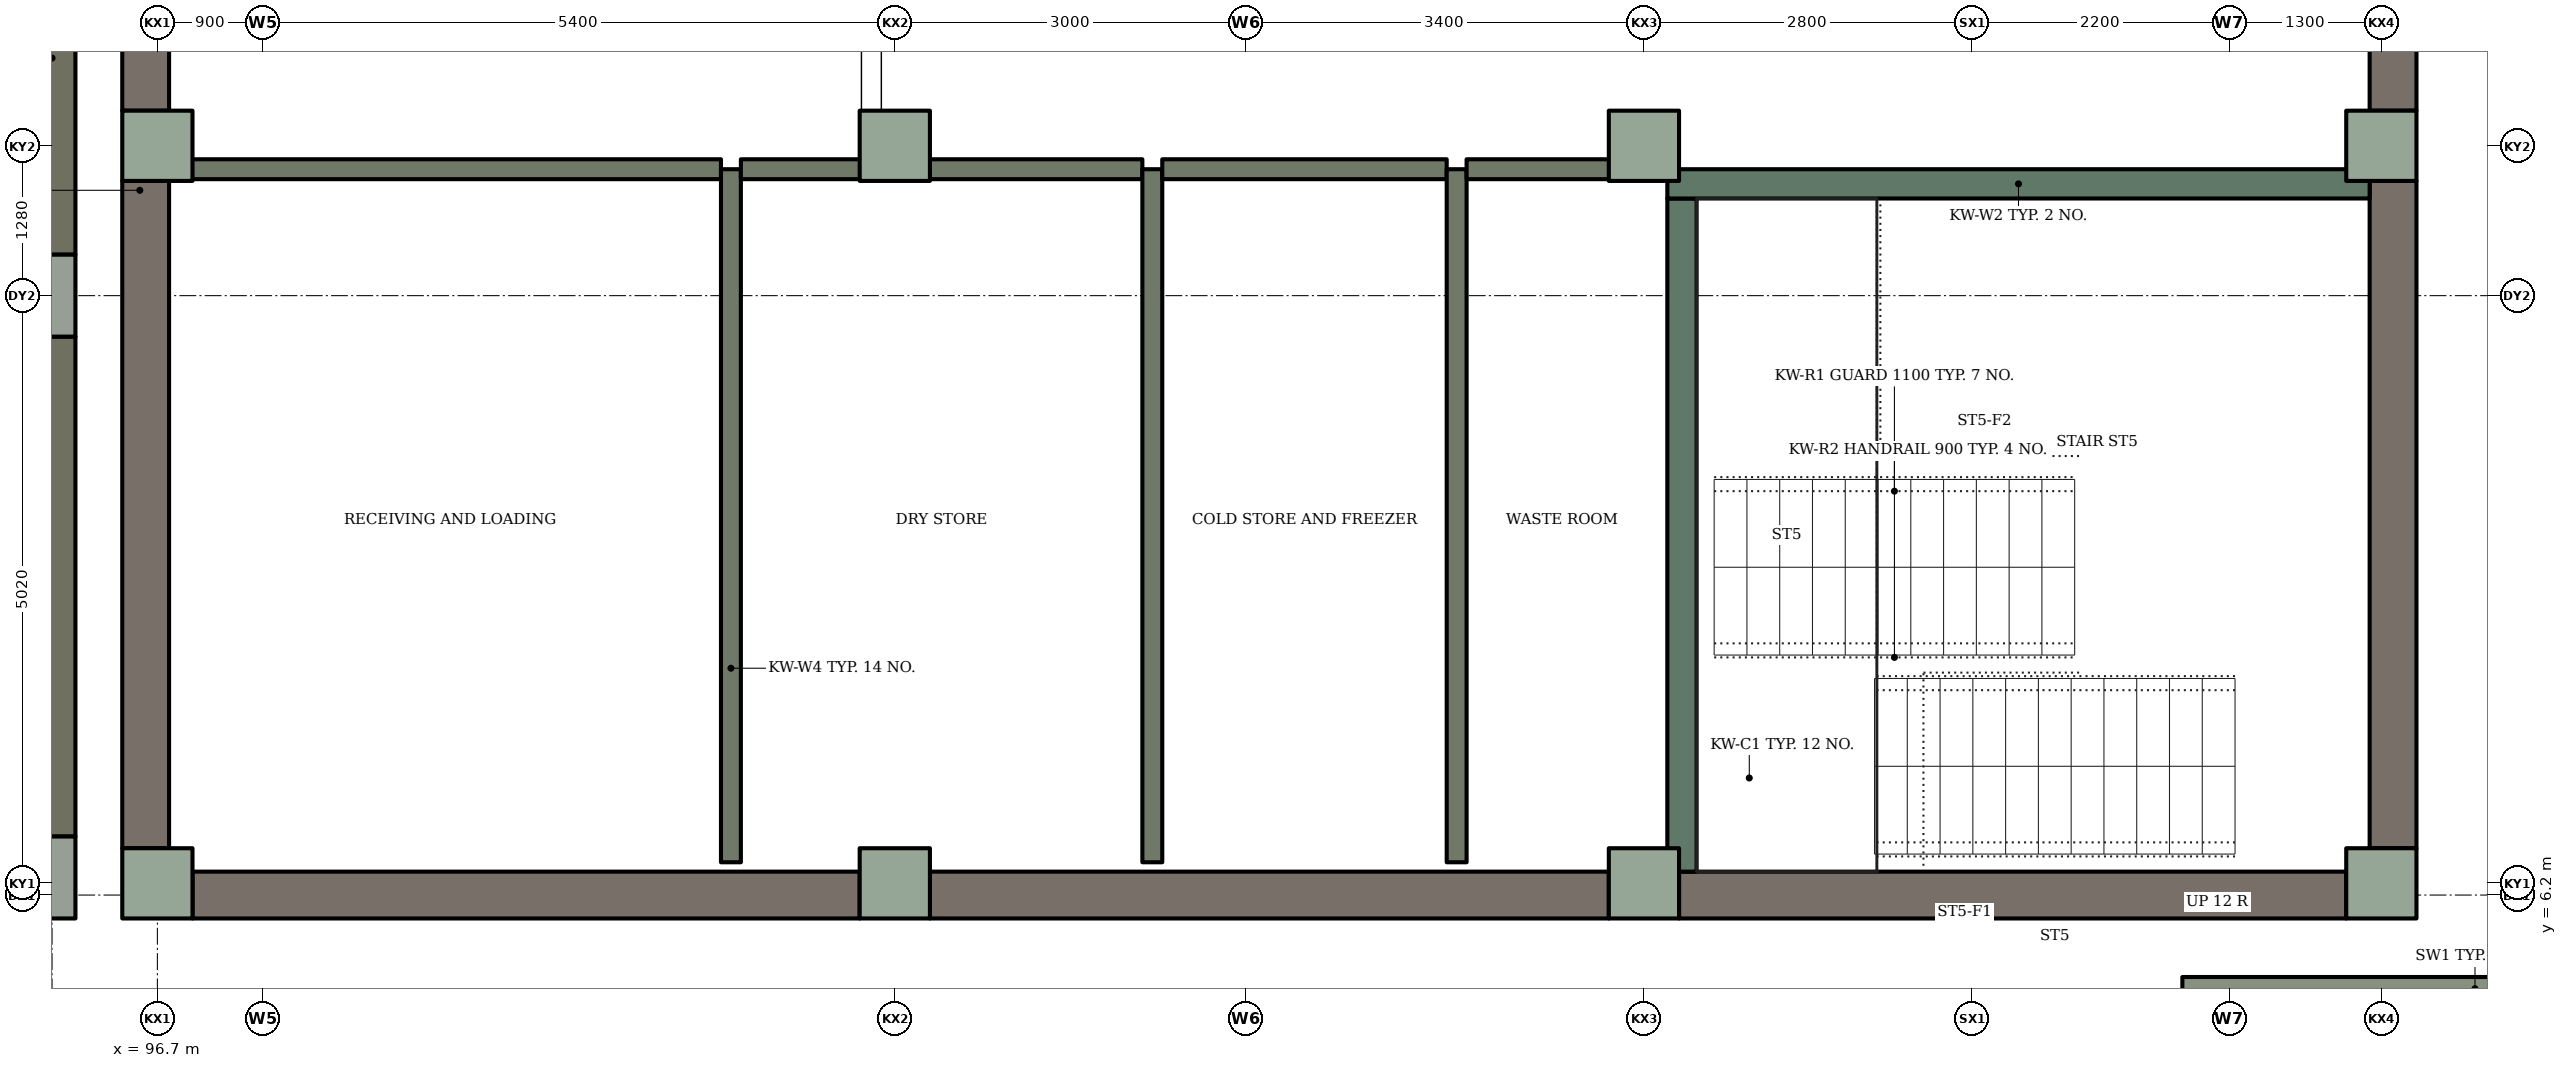
"""IFC4 building model, lengths in metres.
Left out: names, types, materials, properties, quantities, classifications, styles, units other than length and angle.
Written with IfcOpenShell. Run it as: python <this file> out.ifc"""

import sys

from ifc_helpers import new_model, si_unit, direction, frame, frame_2d, origin, origin_2d, place, context, subcontext, project, spatial, rectangle, extrude, element, fill, save


model = new_model("IFC4")
c1 = context("Model", 3, precision=1e-05, world=origin(), true_north=direction((0.0, 1.0)))
c2 = subcontext(c1, "Body", "Model", "MODEL_VIEW")
j1 = project(units=[si_unit("LENGTHUNIT", "METRE"), si_unit("PLANEANGLEUNIT", "RADIAN")], contexts=[c1])
p1 = place(None, origin())
s1 = spatial("IfcSite", under=j1, at=p1, CompositionType="ELEMENT")
p2 = place(p1, origin())
s2 = spatial("IfcBuilding", under=s1, at=p2, CompositionType="ELEMENT")
p3 = place(p2, origin())
s3 = spatial("IfcBuildingStorey", under=s2, at=p3, CompositionType="ELEMENT", Elevation=0.0)
for number, where, z_axis, x_axis in (
    (1, (95.65, 6.35, 0.0), (0.0, 0.0, 1.0), (1.0, 0.0, 0.0)),
    (2, (95.65, 11.32, 0.0), (0.0, 0.0, 1.0), (1.0, 0.0, 0.0)),
):
    element("IfcColumn", number, at=place(p3, frame(where, z_axis=z_axis, x_axis=x_axis)), inside=s3, PredefinedType="COLUMN", context=c2, shape_type="SweptSolid", body=[
        extrude(rectangle(XDim=0.7, YDim=0.7, at=origin_2d()), origin(), (0.0, 0.0, 1.0), 4.2),
    ])
p4 = place(p3, frame((95.8, 6.7, 0.0), z_axis=(0.0, 0.0, 1.0), x_axis=(0.0, 1.0, 0.0)))
e3 = element("IfcWall", 3, at=p4, inside=s3, PredefinedType="SOLIDWALL", context=c2, shape_type="SweptSolid", body=[
    extrude(rectangle(XDim=4.27, YDim=0.4, at=frame_2d((2.135, 0.0))), origin(), (0.0, 0.0, 1.0), 4.2),
])
p5 = place(p4, frame((1.635, 0.0, 0.9)))
e4 = element("IfcOpeningElement", 4, at=p5, cuts=e3, PredefinedType="OPENING", context=c2, shape_type="SweptSolid", body=[
    extrude(rectangle(XDim=1.0, YDim=2.4, at=frame_2d((0.5, 1.2))), frame((0.0, 0.21, 0.0), z_axis=(0.0, -1.0, 0.0), x_axis=(1.0, 0.0, 0.0)), (0.0, 0.0, 1.0), 0.42),
])
p6 = place(p3, frame((95.8, 11.67, 0.0), z_axis=(0.0, 0.0, 1.0), x_axis=(0.0, 1.0, 0.0)))
e5 = element("IfcWall", 5, at=p6, inside=s3, PredefinedType="SOLIDWALL", context=c2, shape_type="SweptSolid", body=[
    extrude(rectangle(XDim=4.42, YDim=0.4, at=frame_2d((2.21, 0.0))), origin(), (0.0, 0.0, 1.0), 4.2),
])
p7 = place(p6, frame((2.58, 0.0, 0.0)))
e6 = element("IfcOpeningElement", 6, at=p7, cuts=e5, PredefinedType="OPENING", context=c2, shape_type="SweptSolid", body=[
    extrude(rectangle(XDim=1.5, YDim=2.1, at=frame_2d((0.75, 1.05))), frame((0.0, 0.21, 0.0), z_axis=(0.0, -1.0, 0.0), x_axis=(1.0, 0.0, 0.0)), (0.0, 0.0, 1.0), 0.42),
])
for number, where, z_axis, x_axis in (
    (7, (96.7, 6.3, 0.0), (0.0, 0.0, 1.0), (1.0, 0.0, 0.0)),
    (8, (96.7, 12.6, 0.0), (0.0, 0.0, 1.0), (1.0, 0.0, 0.0)),
    (9, (103.0, 6.3, 0.0), (0.0, 0.0, 1.0), (1.0, 0.0, 0.0)),
    (10, (103.0, 12.6, 0.0), (0.0, 0.0, 1.0), (1.0, 0.0, 0.0)),
    (11, (109.4, 6.3, 0.0), (0.0, 0.0, 1.0), (1.0, 0.0, 0.0)),
    (12, (109.4, 12.6, 0.0), (0.0, 0.0, 1.0), (1.0, 0.0, 0.0)),
    (13, (115.7, 6.3, 0.0), (0.0, 0.0, 1.0), (1.0, 0.0, 0.0)),
    (14, (115.7, 12.6, 0.0), (0.0, 0.0, 1.0), (1.0, 0.0, 0.0)),
):
    element("IfcColumn", number, at=place(p3, frame(where, z_axis=z_axis, x_axis=x_axis)), inside=s3, PredefinedType="COLUMN", context=c2, shape_type="SweptSolid", body=[
        extrude(rectangle(XDim=0.6, YDim=0.6, at=origin_2d()), origin(), (0.0, 0.0, 1.0), 4.2),
    ])
p8 = place(p3, frame((97.0, 6.2, 0.0), z_axis=(0.0, 0.0, 1.0), x_axis=(1.0, 0.0, 0.0)))
e15 = element("IfcWall", 15, at=p8, inside=s3, PredefinedType="SOLIDWALL", context=c2, shape_type="SweptSolid", body=[
    extrude(rectangle(XDim=5.7, YDim=0.4, at=frame_2d((2.85, 0.0))), origin(), (0.0, 0.0, 1.0), 4.2),
])
p9 = place(p8, frame((1.35, 0.0, 0.0)))
e16 = element("IfcOpeningElement", 16, at=p9, cuts=e15, PredefinedType="OPENING", context=c2, shape_type="SweptSolid", body=[
    extrude(rectangle(XDim=3.0, YDim=3.0, at=frame_2d((1.5, 1.5))), frame((0.0, 0.21, 0.0), z_axis=(0.0, -1.0, 0.0), x_axis=(1.0, 0.0, 0.0)), (0.0, 0.0, 1.0), 0.42),
])
p10 = place(p3, frame((103.3, 6.2, 0.0), z_axis=(0.0, 0.0, 1.0), x_axis=(1.0, 0.0, 0.0)))
e17 = element("IfcWall", 17, at=p10, inside=s3, PredefinedType="SOLIDWALL", context=c2, shape_type="SweptSolid", body=[
    extrude(rectangle(XDim=5.8, YDim=0.4, at=frame_2d((2.9, 0.0))), origin(), (0.0, 0.0, 1.0), 4.2),
])
p11 = place(p10, frame((4.6, 0.0, 0.0)))
e18 = element("IfcOpeningElement", 18, at=p11, cuts=e17, PredefinedType="OPENING", context=c2, shape_type="SweptSolid", body=[
    extrude(rectangle(XDim=1.0, YDim=2.1, at=frame_2d((0.5, 1.05))), frame((0.0, 0.21, 0.0), z_axis=(0.0, -1.0, 0.0), x_axis=(1.0, 0.0, 0.0)), (0.0, 0.0, 1.0), 0.42),
])
for number, where, z_axis, x_axis in (
    (19, (109.7, 6.2, 0.0), (0.0, 0.0, 1.0), (1.0, 0.0, 0.0)),
    (20, (96.6, 12.3, 0.0), (0.0, 0.0, 1.0), (0.0, -1.0, 0.0)),
):
    element("IfcWall", number, at=place(p3, frame(where, z_axis=z_axis, x_axis=x_axis)), inside=s3, PredefinedType="SOLIDWALL", context=c2, shape_type="SweptSolid", body=[
        extrude(rectangle(XDim=5.7, YDim=0.4, at=frame_2d((2.85, 0.0))), origin(), (0.0, 0.0, 1.0), 4.2),
    ])
p12 = place(p3, frame((96.6, 18.7, 0.0), z_axis=(0.0, 0.0, 1.0), x_axis=(0.0, -1.0, 0.0)))
e21 = element("IfcWall", 21, at=p12, inside=s3, PredefinedType="SOLIDWALL", context=c2, shape_type="SweptSolid", body=[
    extrude(rectangle(XDim=5.8, YDim=0.4, at=frame_2d((2.9, 0.0))), origin(), (0.0, 0.0, 1.0), 4.2),
])
p13 = place(p12, frame((2.95, 0.0, 0.0)))
e22 = element("IfcOpeningElement", 22, at=p13, cuts=e21, PredefinedType="OPENING", context=c2, shape_type="SweptSolid", body=[
    extrude(rectangle(XDim=1.5, YDim=2.1, at=frame_2d((0.75, 1.05))), frame((0.0, 0.21, 0.0), z_axis=(0.0, -1.0, 0.0), x_axis=(1.0, 0.0, 0.0)), (0.0, 0.0, 1.0), 0.42),
])
p14 = place(p3, frame((115.8, 12.3, 0.0), z_axis=(0.0, 0.0, 1.0), x_axis=(0.0, -1.0, 0.0)))
e23 = element("IfcWall", 23, at=p14, inside=s3, PredefinedType="SOLIDWALL", context=c2, shape_type="SweptSolid", body=[
    extrude(rectangle(XDim=5.7, YDim=0.4, at=frame_2d((2.85, 0.0))), origin(), (0.0, 0.0, 1.0), 4.2),
])
p15 = place(p14, frame((1.6, 0.0, 0.0)))
e24 = element("IfcOpeningElement", 24, at=p15, cuts=e23, PredefinedType="OPENING", context=c2, shape_type="SweptSolid", body=[
    extrude(rectangle(XDim=1.0, YDim=2.4, at=frame_2d((0.5, 1.2))), frame((0.0, 0.21, 0.0), z_axis=(0.0, -1.0, 0.0), x_axis=(1.0, 0.0, 0.0)), (0.0, 0.0, 1.0), 0.42),
])
p16 = place(p3, frame((115.8, 18.7, 0.0), z_axis=(0.0, 0.0, 1.0), x_axis=(0.0, -1.0, 0.0)))
e25 = element("IfcWall", 25, at=p16, inside=s3, PredefinedType="SOLIDWALL", context=c2, shape_type="SweptSolid", body=[
    extrude(rectangle(XDim=5.8, YDim=0.4, at=frame_2d((2.9, 0.0))), origin(), (0.0, 0.0, 1.0), 4.2),
])
p17 = place(p16, frame((1.7, 0.0, 1.5)))
e26 = element("IfcOpeningElement", 26, at=p17, cuts=e25, PredefinedType="OPENING", context=c2, shape_type="SweptSolid", body=[
    extrude(rectangle(XDim=2.4, YDim=1.2, at=frame_2d((1.2, 0.6))), frame((0.0, 0.21, 0.0), z_axis=(0.0, -1.0, 0.0), x_axis=(1.0, 0.0, 0.0)), (0.0, 0.0, 1.0), 0.42),
])
p18 = place(p3, frame((109.725, 6.4, 0.0), z_axis=(0.0, 0.0, 1.0), x_axis=(0.0, 1.0, 0.0)))
e27 = element("IfcWall", 27, at=p18, inside=s3, PredefinedType="SHEAR", context=c2, shape_type="SweptSolid", body=[
    extrude(rectangle(XDim=5.75, YDim=0.25, at=frame_2d((2.875, 0.0))), origin(), (0.0, 0.0, 1.0), 4.2),
])
p19 = place(p3, frame((109.6, 12.275, 0.0), z_axis=(0.0, 0.0, 1.0), x_axis=(1.0, 0.0, 0.0)))
e28 = element("IfcWall", 28, at=p19, inside=s3, PredefinedType="SHEAR", context=c2, shape_type="SweptSolid", body=[
    extrude(rectangle(XDim=6.0, YDim=0.25, at=frame_2d((3.0, 0.0))), origin(), (0.0, 0.0, 1.0), 4.2),
])
p20 = place(p19, frame((4.164, 0.0, 0.0)))
e29 = element("IfcOpeningElement", 29, at=p20, cuts=e28, PredefinedType="OPENING", context=c2, shape_type="SweptSolid", body=[
    extrude(rectangle(XDim=1.0, YDim=2.1, at=frame_2d((0.5, 1.05))), frame((0.0, 0.135, 0.0), z_axis=(0.0, -1.0, 0.0), x_axis=(1.0, 0.0, 0.0)), (0.0, 0.0, 1.0), 0.27),
])
p21 = place(p3, frame((114.0, 5.4, 0.0), z_axis=(0.0, 0.0, 1.0), x_axis=(1.0, 0.0, 0.0)))
e30 = element("IfcWall", 30, at=p21, inside=s3, PredefinedType="SOLIDWALL", context=c2, shape_type="SweptSolid", body=[
    extrude(rectangle(XDim=5.0, YDim=0.2, at=frame_2d((2.5, 0.0))), origin(), (0.0, 0.0, 1.0), 2.4),
])
p22 = place(p3, frame((96.8, 12.82, 0.0), z_axis=(0.0, 0.0, 1.0), x_axis=(0.0, -1.0, 0.0)))
e31 = element("IfcWall", 31, at=p22, inside=s3, PredefinedType="PARTITIONING", context=c2, shape_type="SweptSolid", body=[
    extrude(rectangle(XDim=0.42, YDim=0.17, at=frame_2d((0.21, 0.0))), origin(), (0.0, 0.0, 1.0), 3.92),
])
p23 = place(p3, frame((101.515, 12.4, 0.0), z_axis=(0.0, 0.0, 1.0), x_axis=(-1.0, 0.0, 0.0)))
e32 = element("IfcWall", 32, at=p23, inside=s3, PredefinedType="PARTITIONING", context=c2, shape_type="SweptSolid", body=[
    extrude(rectangle(XDim=4.63, YDim=0.17, at=frame_2d((2.315, 0.0))), origin(), (0.0, 0.0, 1.0), 3.92),
])
p24 = place(p23, frame((1.665, 0.0, 0.0)))
e33 = element("IfcOpeningElement", 33, at=p24, cuts=e32, PredefinedType="OPENING", context=c2, shape_type="SweptSolid", body=[
    extrude(rectangle(XDim=1.2, YDim=2.1, at=frame_2d((0.6, 1.05))), frame((0.0, 0.095, 0.0), z_axis=(0.0, -1.0, 0.0), x_axis=(1.0, 0.0, 0.0)), (0.0, 0.0, 1.0), 0.19),
])
p25 = place(p3, frame((101.6, 6.48, 0.0), z_axis=(0.0, 0.0, 1.0), x_axis=(0.0, 1.0, 0.0)))
e34 = element("IfcWall", 34, at=p25, inside=s3, PredefinedType="PARTITIONING", context=c2, shape_type="SweptSolid", body=[
    extrude(rectangle(XDim=5.92, YDim=0.17, at=frame_2d((2.96, 0.0))), origin(), (0.0, 0.0, 1.0), 3.92),
])
p26 = place(p25, frame((2.57, 0.0, 0.0)))
e35 = element("IfcOpeningElement", 35, at=p26, cuts=e34, PredefinedType="OPENING", context=c2, shape_type="SweptSolid", body=[
    extrude(rectangle(XDim=0.8, YDim=2.1, at=frame_2d((0.4, 1.05))), frame((0.0, 0.095, 0.0), z_axis=(0.0, -1.0, 0.0), x_axis=(1.0, 0.0, 0.0)), (0.0, 0.0, 1.0), 0.19),
])
p27 = place(p3, frame((102.78, 6.4, 0.0), z_axis=(0.0, 0.0, 1.0), x_axis=(1.0, 0.0, 0.0)))
e36 = element("IfcWall", 36, at=p27, inside=s3, PredefinedType="PARTITIONING", context=c2, shape_type="SweptSolid", body=[
    extrude(rectangle(XDim=0.44, YDim=0.17, at=frame_2d((0.22, 0.0))), origin(), (0.0, 0.0, 1.0), 3.92),
])
p28 = place(p3, frame((102.8, 12.4, 0.0), z_axis=(0.0, 0.0, 1.0), x_axis=(-1.0, 0.0, 0.0)))
e37 = element("IfcWall", 37, at=p28, inside=s3, PredefinedType="PARTITIONING", context=c2, shape_type="SweptSolid", body=[
    extrude(rectangle(XDim=1.115, YDim=0.17, at=frame_2d((0.558, 0.0))), origin(), (0.0, 0.0, 1.0), 3.92),
])
p29 = place(p3, frame((102.8, 12.485, 0.0), z_axis=(0.0, 0.0, 1.0), x_axis=(0.0, 1.0, 0.0)))
e38 = element("IfcWall", 38, at=p29, inside=s3, PredefinedType="PARTITIONING", context=c2, shape_type="SweptSolid", body=[
    extrude(rectangle(XDim=8.915, YDim=0.17, at=frame_2d((4.458, 0.0))), origin(), (0.0, 0.0, 1.0), 3.92),
])
p30 = place(p29, frame((3.865, 0.0, 0.0)))
e39 = element("IfcOpeningElement", 39, at=p30, cuts=e38, PredefinedType="OPENING", context=c2, shape_type="SweptSolid", body=[
    extrude(rectangle(XDim=1.2, YDim=2.1, at=frame_2d((0.6, 1.05))), frame((0.0, 0.095, 0.0), z_axis=(0.0, -1.0, 0.0), x_axis=(1.0, 0.0, 0.0)), (0.0, 0.0, 1.0), 0.19),
])
p31 = place(p3, frame((105.115, 12.4, 0.0), z_axis=(0.0, 0.0, 1.0), x_axis=(-1.0, 0.0, 0.0)))
e40 = element("IfcWall", 40, at=p31, inside=s3, PredefinedType="PARTITIONING", context=c2, shape_type="SweptSolid", body=[
    extrude(rectangle(XDim=2.23, YDim=0.17, at=frame_2d((1.115, 0.0))), origin(), (0.0, 0.0, 1.0), 3.92),
])
p32 = place(p3, frame((105.2, 6.48, 0.0), z_axis=(0.0, 0.0, 1.0), x_axis=(0.0, 1.0, 0.0)))
e41 = element("IfcWall", 41, at=p32, inside=s3, PredefinedType="PARTITIONING", context=c2, shape_type="SweptSolid", body=[
    extrude(rectangle(XDim=5.92, YDim=0.17, at=frame_2d((2.96, 0.0))), origin(), (0.0, 0.0, 1.0), 3.92),
])
p33 = place(p32, frame((2.57, 0.0, 0.0)))
e42 = element("IfcOpeningElement", 42, at=p33, cuts=e41, PredefinedType="OPENING", context=c2, shape_type="SweptSolid", body=[
    extrude(rectangle(XDim=0.8, YDim=2.1, at=frame_2d((0.4, 1.05))), frame((0.0, 0.095, 0.0), z_axis=(0.0, -1.0, 0.0), x_axis=(1.0, 0.0, 0.0)), (0.0, 0.0, 1.0), 0.19),
])
p34 = place(p3, frame((107.715, 12.4, 0.0), z_axis=(0.0, 0.0, 1.0), x_axis=(-1.0, 0.0, 0.0)))
e43 = element("IfcWall", 43, at=p34, inside=s3, PredefinedType="PARTITIONING", context=c2, shape_type="SweptSolid", body=[
    extrude(rectangle(XDim=2.43, YDim=0.17, at=frame_2d((1.215, 0.0))), origin(), (0.0, 0.0, 1.0), 3.92),
])
p35 = place(p3, frame((107.8, 6.48, 0.0), z_axis=(0.0, 0.0, 1.0), x_axis=(0.0, 1.0, 0.0)))
e44 = element("IfcWall", 44, at=p35, inside=s3, PredefinedType="PARTITIONING", context=c2, shape_type="SweptSolid", body=[
    extrude(rectangle(XDim=5.92, YDim=0.17, at=frame_2d((2.96, 0.0))), origin(), (0.0, 0.0, 1.0), 3.92),
])
p36 = place(p3, frame((109.18, 6.4, 0.0), z_axis=(0.0, 0.0, 1.0), x_axis=(1.0, 0.0, 0.0)))
e45 = element("IfcWall", 45, at=p36, inside=s3, PredefinedType="PARTITIONING", context=c2, shape_type="SweptSolid", body=[
    extrude(rectangle(XDim=0.34, YDim=0.17, at=frame_2d((0.17, 0.0))), origin(), (0.0, 0.0, 1.0), 3.92),
])
p37 = place(p3, frame((109.52, 12.4, 0.0), z_axis=(0.0, 0.0, 1.0), x_axis=(-1.0, 0.0, 0.0)))
e46 = element("IfcWall", 46, at=p37, inside=s3, PredefinedType="PARTITIONING", context=c2, shape_type="SweptSolid", body=[
    extrude(rectangle(XDim=1.635, YDim=0.17, at=frame_2d((0.817, 0.0))), origin(), (0.0, 0.0, 1.0), 3.92),
])
p38 = place(p3, frame((115.6, 12.48, 0.0), z_axis=(0.0, 0.0, 1.0), x_axis=(0.0, 1.0, 0.0)))
e47 = element("IfcWall", 47, at=p38, inside=s3, PredefinedType="PARTITIONING", context=c2, shape_type="SweptSolid", body=[
    extrude(rectangle(XDim=0.34, YDim=0.17, at=frame_2d((0.17, 0.0))), origin(), (0.0, 0.0, 1.0), 3.92),
])
p39 = place(p5, origin())
e48 = element("IfcWindow", 48, at=p39, inside=s3, PartitioningType="SINGLE_PANEL", PredefinedType="WINDOW", context=c2, shape_type="SweptSolid", body=[
    extrude(rectangle(XDim=1.0, YDim=2.4, at=frame_2d((0.5, 1.2))), frame((0.0, 0.03, 0.0), z_axis=(0.0, -1.0, 0.0), x_axis=(1.0, 0.0, 0.0)), (0.0, 0.0, 1.0), 0.06),
])
fill(e4, e48)
p40 = place(p9, origin())
e49 = element("IfcDoor", 49, at=p40, inside=s3, OperationType="ROLLINGUP", PredefinedType="DOOR", context=c2, shape_type="SweptSolid", body=[
    extrude(rectangle(XDim=3.0, YDim=3.0, at=frame_2d((1.5, 1.5))), frame((0.0, 0.025, 0.0), z_axis=(0.0, -1.0, 0.0), x_axis=(1.0, 0.0, 0.0)), (0.0, 0.0, 1.0), 0.05),
])
fill(e16, e49)
p41 = place(p15, origin())
e50 = element("IfcDoor", 50, at=p41, inside=s3, OperationType="SINGLE_SWING_LEFT", PredefinedType="DOOR", context=c2, shape_type="SweptSolid", body=[
    extrude(rectangle(XDim=1.0, YDim=2.4, at=frame_2d((0.5, 1.2))), frame((0.0, 0.025, 0.0), z_axis=(0.0, -1.0, 0.0), x_axis=(1.0, 0.0, 0.0)), (0.0, 0.0, 1.0), 0.05),
])
fill(e24, e50)
p42 = place(p11, origin())
e51 = element("IfcDoor", 51, at=p42, inside=s3, OperationType="SINGLE_SWING_LEFT", PredefinedType="DOOR", context=c2, shape_type="SweptSolid", body=[
    extrude(rectangle(XDim=1.0, YDim=2.1, at=frame_2d((0.5, 1.05))), frame((0.0, 0.025, 0.0), z_axis=(0.0, -1.0, 0.0), x_axis=(1.0, 0.0, 0.0)), (0.0, 0.0, 1.0), 0.05),
])
fill(e18, e51)
p43 = place(p24, origin())
e52 = element("IfcDoor", 52, at=p43, inside=s3, OperationType="SINGLE_SWING_LEFT", PredefinedType="DOOR", context=c2, shape_type="SweptSolid", body=[
    extrude(rectangle(XDim=1.2, YDim=2.1, at=frame_2d((0.6, 1.05))), frame((0.0, 0.025, 0.0), z_axis=(0.0, -1.0, 0.0), x_axis=(1.0, 0.0, 0.0)), (0.0, 0.0, 1.0), 0.05),
])
fill(e33, e52)
p44 = place(p26, origin())
e53 = element("IfcDoor", 53, at=p44, inside=s3, OperationType="SINGLE_SWING_LEFT", PredefinedType="DOOR", context=c2, shape_type="SweptSolid", body=[
    extrude(rectangle(XDim=0.8, YDim=2.1, at=frame_2d((0.4, 1.05))), frame((0.0, 0.025, 0.0), z_axis=(0.0, -1.0, 0.0), x_axis=(1.0, 0.0, 0.0)), (0.0, 0.0, 1.0), 0.05),
])
fill(e35, e53)
p45 = place(p33, origin())
e54 = element("IfcDoor", 54, at=p45, inside=s3, OperationType="SINGLE_SWING_LEFT", PredefinedType="DOOR", context=c2, shape_type="SweptSolid", body=[
    extrude(rectangle(XDim=0.8, YDim=2.1, at=frame_2d((0.4, 1.05))), frame((0.0, 0.025, 0.0), z_axis=(0.0, -1.0, 0.0), x_axis=(1.0, 0.0, 0.0)), (0.0, 0.0, 1.0), 0.05),
])
fill(e42, e54)
p46 = place(p20, origin())
e55 = element("IfcDoor", 55, at=p46, inside=s3, OperationType="SINGLE_SWING_LEFT", PredefinedType="DOOR", context=c2, shape_type="SweptSolid", body=[
    extrude(rectangle(XDim=1.0, YDim=2.1, at=frame_2d((0.5, 1.05))), frame((0.0, 0.025, 0.0), z_axis=(0.0, -1.0, 0.0), x_axis=(1.0, 0.0, 0.0)), (0.0, 0.0, 1.0), 0.05),
])
fill(e29, e55)
save(model, sys.argv[1])
